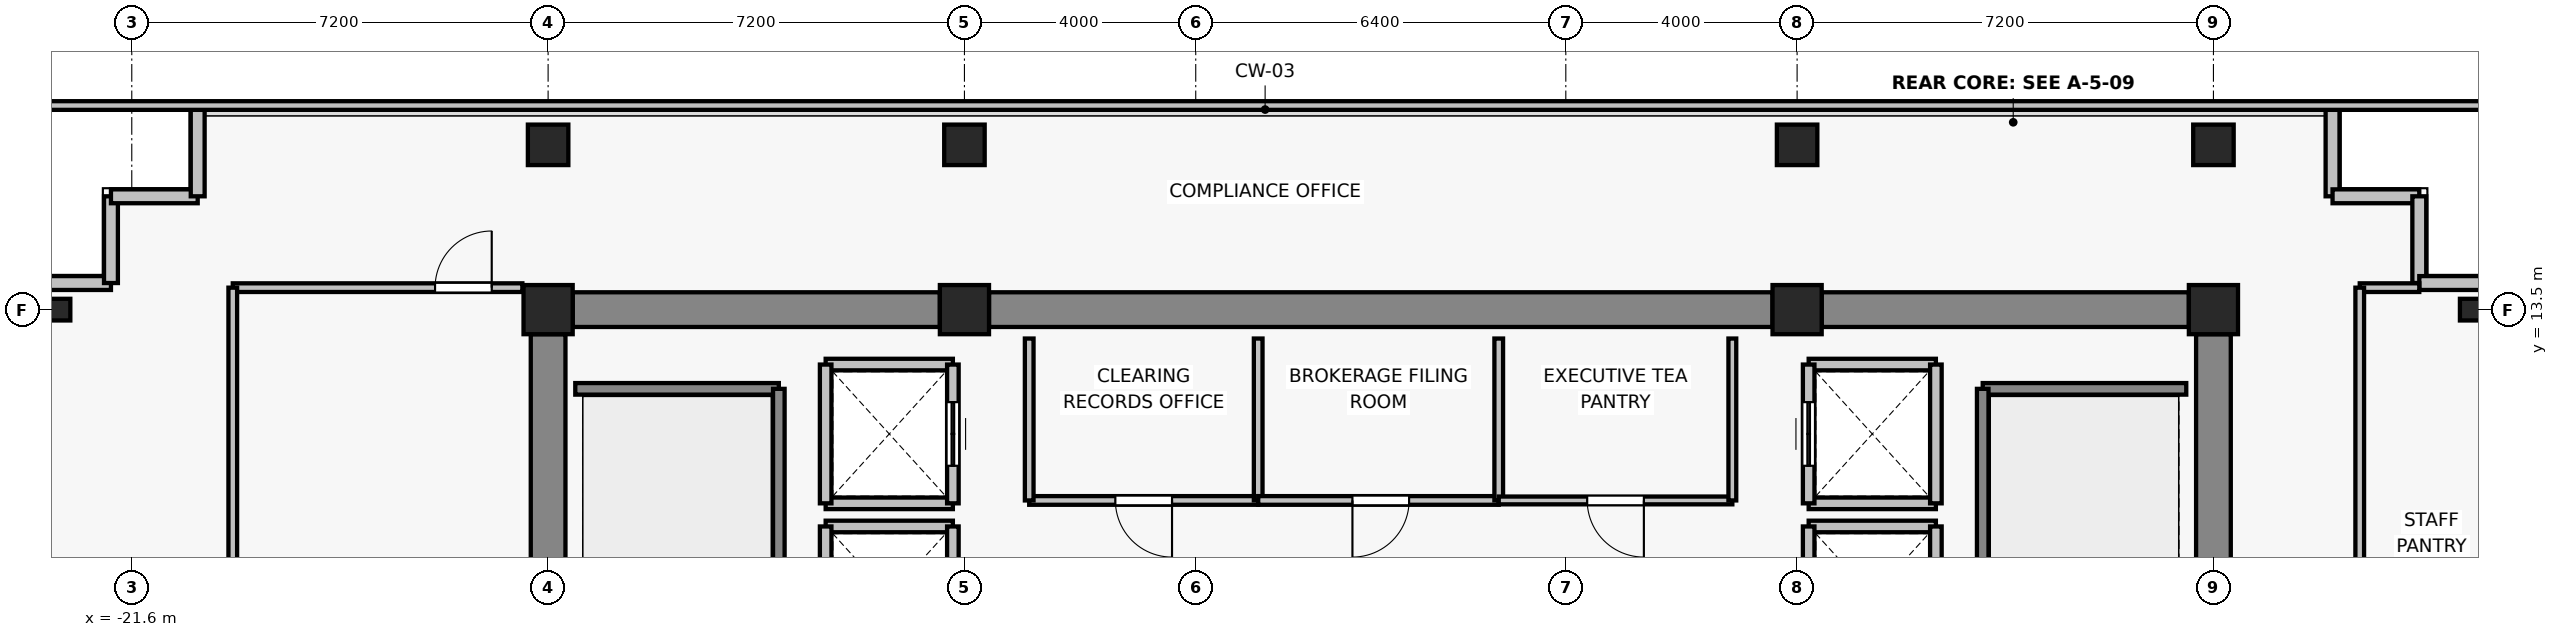
"""IFC4 building model, lengths in metres.
Left out: names, types, materials, properties, quantities, classifications, styles, units other than length and angle.
Written with IfcOpenShell. Run it as: python <this file> out.ifc"""

import sys

from ifc_helpers import new_model, si_unit, direction, frame, frame_2d, origin, origin_2d, place, context, subcontext, project, spatial, rectangle, i_section, extrude, source, transform, mapped, element, fill, save


model = new_model("IFC4")
c1 = context("Model", 3, precision=1e-05, world=origin(), true_north=direction((0.0, 1.0)))
c2 = subcontext(c1, "Body", "Model", "MODEL_VIEW")
j1 = project(units=[si_unit("LENGTHUNIT", "METRE"), si_unit("PLANEANGLEUNIT", "RADIAN")], contexts=[c1])
p1 = place(None, origin())
s1 = spatial("IfcSite", under=j1, at=p1, CompositionType="ELEMENT")
p2 = place(p1, origin())
s2 = spatial("IfcBuilding", under=s1, at=p2, CompositionType="ELEMENT")
p3 = place(p2, frame((0.0, 0.0, 222.1)))
s3 = spatial("IfcBuildingStorey", under=s2, at=p3, CompositionType="ELEMENT", Elevation=222.1)
for number, where, z_axis, x_axis in (
    (1, (-14.4, 13.5, 0.0), (0.0, 0.0, 1.0), (1.0, 0.0, 0.0)),
    (2, (-7.2, 13.5, 0.0), (0.0, 0.0, 1.0), (1.0, 0.0, 0.0)),
    (3, (7.2, 13.5, 0.0), (0.0, 0.0, 1.0), (1.0, 0.0, 0.0)),
    (4, (14.4, 13.5, 0.0), (0.0, 0.0, 1.0), (1.0, 0.0, 0.0)),
):
    element("IfcColumn", number, at=place(p3, frame(where, z_axis=z_axis, x_axis=x_axis)), inside=s3, PredefinedType="COLUMN", context=c2, shape_type="SweptSolid", body=[
        extrude(rectangle(XDim=0.85, YDim=0.85, at=origin_2d()), origin(), (0.0, 0.0, 1.0), 3.3),
    ])
for number, where, z_axis, x_axis in (
    (5, (-14.4, 16.35, 0.0), (0.0, 0.0, 1.0), (1.0, 0.0, 0.0)),
    (6, (-7.2, 16.35, 0.0), (0.0, 0.0, 1.0), (1.0, 0.0, 0.0)),
    (7, (7.2, 16.35, 0.0), (0.0, 0.0, 1.0), (1.0, 0.0, 0.0)),
    (8, (14.4, 16.35, 0.0), (0.0, 0.0, 1.0), (1.0, 0.0, 0.0)),
):
    element("IfcColumn", number, at=place(p3, frame(where, z_axis=z_axis, x_axis=x_axis)), inside=s3, PredefinedType="COLUMN", context=c2, shape_type="SweptSolid", body=[
        extrude(rectangle(XDim=0.7, YDim=0.7, at=origin_2d()), origin(), (0.0, 0.0, 1.0), 3.3),
    ])
for number, where, z_axis, x_axis in (
    (9, (-22.85, 13.5, 0.0), (0.0, 0.0, 1.0), (1.0, 0.0, 0.0)),
    (10, (18.85, 13.5, 0.0), (0.0, 0.0, 1.0), (1.0, 0.0, 0.0)),
):
    element("IfcColumn", number, at=place(p3, frame(where, z_axis=z_axis, x_axis=x_axis)), inside=s3, PredefinedType="COLUMN", context=c2, shape_type="SweptSolid", body=[
        extrude(i_section(OverallWidth=0.375, OverallDepth=0.375, WebThickness=0.017, FlangeThickness=0.027, FilletRadius=0.015, at=origin_2d()), origin(), (0.0, 0.0, 1.0), 3.3),
    ])
p4 = place(p3, frame((-13.975, 13.5, 0.0), z_axis=(0.0, 0.0, 1.0), x_axis=(1.0, 0.0, 0.0)))
e11 = element("IfcWall", 11, at=p4, inside=s3, PredefinedType="SHEAR", context=c2, shape_type="SweptSolid", body=[
    extrude(rectangle(XDim=6.35, YDim=0.6, at=frame_2d((3.175, 0.0))), origin(), (0.0, 0.0, 1.0), 3.075),
])
p5 = place(p3, frame((-6.775, 13.5, 0.0), z_axis=(0.0, 0.0, 1.0), x_axis=(1.0, 0.0, 0.0)))
e12 = element("IfcWall", 12, at=p5, inside=s3, PredefinedType="SHEAR", context=c2, shape_type="SweptSolid", body=[
    extrude(rectangle(XDim=13.55, YDim=0.6, at=frame_2d((6.775, 0.0))), origin(), (0.0, 0.0, 1.0), 3.075),
])
p6 = place(p3, frame((7.625, 13.5, 0.0), z_axis=(0.0, 0.0, 1.0), x_axis=(1.0, 0.0, 0.0)))
e13 = element("IfcWall", 13, at=p6, inside=s3, PredefinedType="SHEAR", context=c2, shape_type="SweptSolid", body=[
    extrude(rectangle(XDim=6.35, YDim=0.6, at=frame_2d((3.175, 0.0))), origin(), (0.0, 0.0, 1.0), 3.075),
])
for number, where, z_axis, x_axis in (
    (14, (-14.4, 7.025, 0.0), (0.0, 0.0, 1.0), (0.0, 1.0, 0.0)),
    (15, (14.4, 7.025, 0.0), (0.0, 0.0, 1.0), (0.0, 1.0, 0.0)),
):
    element("IfcWall", number, at=place(p3, frame(where, z_axis=z_axis, x_axis=x_axis)), inside=s3, PredefinedType="SHEAR", context=c2, shape_type="SweptSolid", body=[
        extrude(rectangle(XDim=6.05, YDim=0.6, at=frame_2d((3.025, 0.0))), origin(), (0.0, 0.0, 1.0), 3.075),
    ])
for number, where, z_axis, x_axis in (
    (16, (-21.96, 13.96, 0.0), (0.0, 0.0, 1.0), (-1.0, 0.0, 0.0)),
    (17, (-21.96, 15.46, 0.0), (0.0, 0.0, 1.0), (0.0, -1.0, 0.0)),
    (18, (-20.46, 15.46, 0.0), (0.0, 0.0, 1.0), (-1.0, 0.0, 0.0)),
    (19, (-20.46, 16.96, 0.0), (0.0, 0.0, 1.0), (0.0, -1.0, 0.0)),
    (20, (16.46, 15.46, 0.0), (0.0, 0.0, 1.0), (0.0, 1.0, 0.0)),
    (21, (17.96, 15.46, 0.0), (0.0, 0.0, 1.0), (-1.0, 0.0, 0.0)),
    (22, (17.96, 13.96, 0.0), (0.0, 0.0, 1.0), (0.0, 1.0, 0.0)),
    (23, (19.46, 13.96, 0.0), (0.0, 0.0, 1.0), (-1.0, 0.0, 0.0)),
):
    element("IfcWall", number, at=place(p3, frame(where, z_axis=z_axis, x_axis=x_axis)), inside=s3, PredefinedType="SOLIDWALL", context=c2, shape_type="SweptSolid", body=[
        extrude(rectangle(XDim=1.5, YDim=0.24, at=frame_2d((0.75, 0.0))), origin(), (0.0, 0.0, 1.0), 3.075),
    ])
p7 = place(p3, frame((-9.6, 9.75, 0.0), z_axis=(0.0, 0.0, 1.0), x_axis=(1.0, 0.0, 0.0)))
e24 = element("IfcWall", 24, at=p7, inside=s3, PredefinedType="SOLIDWALL", context=c2, shape_type="SweptSolid", body=[
    extrude(rectangle(XDim=2.2, YDim=0.2, at=frame_2d((1.1, 0.0))), origin(), (0.0, 0.0, 1.0), 2.615),
])
p8 = place(p3, frame((-9.6, 7.35, 0.0), z_axis=(0.0, 0.0, 1.0), x_axis=(0.0, 1.0, 0.0)))
e25 = element("IfcWall", 25, at=p8, inside=s3, PredefinedType="SOLIDWALL", context=c2, shape_type="SweptSolid", body=[
    extrude(rectangle(XDim=2.4, YDim=0.2, at=frame_2d((1.2, 0.0))), origin(), (0.0, 0.0, 1.0), 3.075),
])
p9 = place(p3, frame((-7.4, 9.75, 0.0), z_axis=(0.0, 0.0, 1.0), x_axis=(0.0, -1.0, 0.0)))
e26 = element("IfcWall", 26, at=p9, inside=s3, PredefinedType="SOLIDWALL", context=c2, shape_type="SweptSolid", body=[
    extrude(rectangle(XDim=2.4, YDim=0.2, at=frame_2d((1.2, 0.0))), origin(), (0.0, 0.0, 1.0), 2.615),
])
p10 = place(p9, frame((0.65, 0.0, 0.0)))
e27 = element("IfcOpeningElement", 27, at=p10, cuts=e26, PredefinedType="OPENING", context=c2, shape_type="SweptSolid", body=[
    extrude(rectangle(XDim=1.1, YDim=2.2, at=frame_2d((0.55, 1.1))), frame((0.0, 0.11, 0.0), z_axis=(0.0, -1.0, 0.0), x_axis=(1.0, 0.0, 0.0)), (0.0, 0.0, 1.0), 0.22),
])
for number, where, z_axis, x_axis in (
    (28, (-7.4, 10.15, 0.0), (0.0, 0.0, 1.0), (-1.0, 0.0, 0.0)),
    (29, (-9.6, 12.55, 0.0), (0.0, 0.0, 1.0), (1.0, 0.0, 0.0)),
):
    element("IfcWall", number, at=place(p3, frame(where, z_axis=z_axis, x_axis=x_axis)), inside=s3, PredefinedType="SOLIDWALL", context=c2, shape_type="SweptSolid", body=[
        extrude(rectangle(XDim=2.2, YDim=0.2, at=frame_2d((1.1, 0.0))), origin(), (0.0, 0.0, 1.0), 2.615),
    ])
p11 = place(p3, frame((-9.6, 10.15, 0.0), z_axis=(0.0, 0.0, 1.0), x_axis=(0.0, 1.0, 0.0)))
e30 = element("IfcWall", 30, at=p11, inside=s3, PredefinedType="SOLIDWALL", context=c2, shape_type="SweptSolid", body=[
    extrude(rectangle(XDim=2.4, YDim=0.2, at=frame_2d((1.2, 0.0))), origin(), (0.0, 0.0, 1.0), 3.075),
])
p12 = place(p3, frame((-7.4, 12.55, 0.0), z_axis=(0.0, 0.0, 1.0), x_axis=(0.0, -1.0, 0.0)))
e31 = element("IfcWall", 31, at=p12, inside=s3, PredefinedType="SOLIDWALL", context=c2, shape_type="SweptSolid", body=[
    extrude(rectangle(XDim=2.4, YDim=0.2, at=frame_2d((1.2, 0.0))), origin(), (0.0, 0.0, 1.0), 2.615),
])
p13 = place(p12, frame((0.65, 0.0, 0.0)))
e32 = element("IfcOpeningElement", 32, at=p13, cuts=e31, PredefinedType="OPENING", context=c2, shape_type="SweptSolid", body=[
    extrude(rectangle(XDim=1.1, YDim=2.2, at=frame_2d((0.55, 1.1))), frame((0.0, 0.11, 0.0), z_axis=(0.0, -1.0, 0.0), x_axis=(1.0, 0.0, 0.0)), (0.0, 0.0, 1.0), 0.22),
])
p14 = place(p3, frame((7.4, 9.75, 0.0), z_axis=(0.0, 0.0, 1.0), x_axis=(1.0, 0.0, 0.0)))
e33 = element("IfcWall", 33, at=p14, inside=s3, PredefinedType="SOLIDWALL", context=c2, shape_type="SweptSolid", body=[
    extrude(rectangle(XDim=2.2, YDim=0.2, at=frame_2d((1.1, 0.0))), origin(), (0.0, 0.0, 1.0), 2.615),
])
p15 = place(p3, frame((7.4, 7.35, 0.0), z_axis=(0.0, 0.0, 1.0), x_axis=(0.0, 1.0, 0.0)))
e34 = element("IfcWall", 34, at=p15, inside=s3, PredefinedType="SOLIDWALL", context=c2, shape_type="SweptSolid", body=[
    extrude(rectangle(XDim=2.4, YDim=0.2, at=frame_2d((1.2, 0.0))), origin(), (0.0, 0.0, 1.0), 2.615),
])
p16 = place(p15, frame((0.65, 0.0, 0.0)))
e35 = element("IfcOpeningElement", 35, at=p16, cuts=e34, PredefinedType="OPENING", context=c2, shape_type="SweptSolid", body=[
    extrude(rectangle(XDim=1.1, YDim=2.2, at=frame_2d((0.55, 1.1))), frame((0.0, 0.11, 0.0), z_axis=(0.0, -1.0, 0.0), x_axis=(1.0, 0.0, 0.0)), (0.0, 0.0, 1.0), 0.22),
])
p17 = place(p3, frame((9.6, 9.75, 0.0), z_axis=(0.0, 0.0, 1.0), x_axis=(0.0, -1.0, 0.0)))
e36 = element("IfcWall", 36, at=p17, inside=s3, PredefinedType="SOLIDWALL", context=c2, shape_type="SweptSolid", body=[
    extrude(rectangle(XDim=2.4, YDim=0.2, at=frame_2d((1.2, 0.0))), origin(), (0.0, 0.0, 1.0), 3.075),
])
for number, where, z_axis, x_axis in (
    (37, (9.6, 10.15, 0.0), (0.0, 0.0, 1.0), (-1.0, 0.0, 0.0)),
    (38, (7.4, 12.55, 0.0), (0.0, 0.0, 1.0), (1.0, 0.0, 0.0)),
):
    element("IfcWall", number, at=place(p3, frame(where, z_axis=z_axis, x_axis=x_axis)), inside=s3, PredefinedType="SOLIDWALL", context=c2, shape_type="SweptSolid", body=[
        extrude(rectangle(XDim=2.2, YDim=0.2, at=frame_2d((1.1, 0.0))), origin(), (0.0, 0.0, 1.0), 2.615),
    ])
p18 = place(p3, frame((7.4, 10.15, 0.0), z_axis=(0.0, 0.0, 1.0), x_axis=(0.0, 1.0, 0.0)))
e39 = element("IfcWall", 39, at=p18, inside=s3, PredefinedType="SOLIDWALL", context=c2, shape_type="SweptSolid", body=[
    extrude(rectangle(XDim=2.4, YDim=0.2, at=frame_2d((1.2, 0.0))), origin(), (0.0, 0.0, 1.0), 2.615),
])
p19 = place(p18, frame((0.65, 0.0, 0.0)))
e40 = element("IfcOpeningElement", 40, at=p19, cuts=e39, PredefinedType="OPENING", context=c2, shape_type="SweptSolid", body=[
    extrude(rectangle(XDim=1.1, YDim=2.2, at=frame_2d((0.55, 1.1))), frame((0.0, 0.11, 0.0), z_axis=(0.0, -1.0, 0.0), x_axis=(1.0, 0.0, 0.0)), (0.0, 0.0, 1.0), 0.22),
])
p20 = place(p3, frame((9.6, 12.55, 0.0), z_axis=(0.0, 0.0, 1.0), x_axis=(0.0, -1.0, 0.0)))
e41 = element("IfcWall", 41, at=p20, inside=s3, PredefinedType="SOLIDWALL", context=c2, shape_type="SweptSolid", body=[
    extrude(rectangle(XDim=2.4, YDim=0.2, at=frame_2d((1.2, 0.0))), origin(), (0.0, 0.0, 1.0), 3.075),
])
p21 = place(p3, frame((-13.93, 12.13, 0.0), z_axis=(0.0, 0.0, 1.0), x_axis=(1.0, 0.0, 0.0)))
e42 = element("IfcWall", 42, at=p21, inside=s3, PredefinedType="SOLIDWALL", context=c2, shape_type="SweptSolid", body=[
    extrude(rectangle(XDim=3.52, YDim=0.2, at=frame_2d((1.76, 0.0))), origin(), (0.0, 0.0, 1.0), 3.075),
])
p22 = place(p3, frame((-10.41, 12.13, 0.0), z_axis=(0.0, 0.0, 1.0), x_axis=(0.0, -1.0, 0.0)))
e43 = element("IfcWall", 43, at=p22, inside=s3, PredefinedType="SOLIDWALL", context=c2, shape_type="SweptSolid", body=[
    extrude(rectangle(XDim=8.84, YDim=0.2, at=frame_2d((4.42, 0.0))), origin(), (0.0, 0.0, 1.0), 3.075),
])
p23 = place(p3, frame((10.41, 12.13, 0.0), z_axis=(0.0, 0.0, 1.0), x_axis=(1.0, 0.0, 0.0)))
e44 = element("IfcWall", 44, at=p23, inside=s3, PredefinedType="SOLIDWALL", context=c2, shape_type="SweptSolid", body=[
    extrude(rectangle(XDim=3.52, YDim=0.2, at=frame_2d((1.76, 0.0))), origin(), (0.0, 0.0, 1.0), 3.075),
])
p24 = place(p3, frame((10.41, 3.29, 0.0), z_axis=(0.0, 0.0, 1.0), x_axis=(0.0, 1.0, 0.0)))
e45 = element("IfcWall", 45, at=p24, inside=s3, PredefinedType="SOLIDWALL", context=c2, shape_type="SweptSolid", body=[
    extrude(rectangle(XDim=8.84, YDim=0.2, at=frame_2d((4.42, 0.0))), origin(), (0.0, 0.0, 1.0), 3.075),
])
p25 = place(p3, frame((-2.12, 10.2, 0.0), z_axis=(0.0, 0.0, 1.0), x_axis=(-1.0, 0.0, 0.0)))
e46 = element("IfcWall", 46, at=p25, inside=s3, PredefinedType="PARTITIONING", context=c2, shape_type="SweptSolid", body=[
    extrude(rectangle(XDim=3.96, YDim=0.15, at=frame_2d((1.98, 0.0))), origin(), (0.0, 0.0, 1.0), 3.075),
])
p26 = place(p25, frame((1.49, 0.0, 0.0)))
e47 = element("IfcOpeningElement", 47, at=p26, cuts=e46, PredefinedType="OPENING", context=c2, shape_type="SweptSolid", body=[
    extrude(rectangle(XDim=0.98, YDim=2.15, at=frame_2d((0.49, 1.075))), frame((0.0, 0.085, 0.0), z_axis=(0.0, -1.0, 0.0), x_axis=(1.0, 0.0, 0.0)), (0.0, 0.0, 1.0), 0.17),
])
for number, where, z_axis, x_axis in (
    (48, (-6.08, 10.2, 0.0), (0.0, 0.0, 1.0), (0.0, 1.0, 0.0)),
    (49, (-2.12, 13.0, 0.0), (0.0, 0.0, 1.0), (0.0, -1.0, 0.0)),
):
    element("IfcWall", number, at=place(p3, frame(where, z_axis=z_axis, x_axis=x_axis)), inside=s3, PredefinedType="PARTITIONING", context=c2, shape_type="SweptSolid", body=[
        extrude(rectangle(XDim=2.8, YDim=0.15, at=frame_2d((1.4, 0.0))), origin(), (0.0, 0.0, 1.0), 3.075),
    ])
p27 = place(p3, frame((2.04, 10.2, 0.0), z_axis=(0.0, 0.0, 1.0), x_axis=(-1.0, 0.0, 0.0)))
e50 = element("IfcWall", 50, at=p27, inside=s3, PredefinedType="PARTITIONING", context=c2, shape_type="SweptSolid", body=[
    extrude(rectangle(XDim=4.16, YDim=0.15, at=frame_2d((2.08, 0.0))), origin(), (0.0, 0.0, 1.0), 3.075),
])
p28 = place(p27, frame((1.55, 0.0, 0.0)))
e51 = element("IfcOpeningElement", 51, at=p28, cuts=e50, PredefinedType="OPENING", context=c2, shape_type="SweptSolid", body=[
    extrude(rectangle(XDim=0.98, YDim=2.15, at=frame_2d((0.49, 1.075))), frame((0.0, 0.085, 0.0), z_axis=(0.0, -1.0, 0.0), x_axis=(1.0, 0.0, 0.0)), (0.0, 0.0, 1.0), 0.17),
])
p29 = place(p3, frame((2.04, 13.0, 0.0), z_axis=(0.0, 0.0, 1.0), x_axis=(0.0, -1.0, 0.0)))
e52 = element("IfcWall", 52, at=p29, inside=s3, PredefinedType="PARTITIONING", context=c2, shape_type="SweptSolid", body=[
    extrude(rectangle(XDim=2.8, YDim=0.15, at=frame_2d((1.4, 0.0))), origin(), (0.0, 0.0, 1.0), 3.075),
])
p30 = place(p3, frame((6.08, 10.2, 0.0), z_axis=(0.0, 0.0, 1.0), x_axis=(-1.0, 0.0, 0.0)))
e53 = element("IfcWall", 53, at=p30, inside=s3, PredefinedType="PARTITIONING", context=c2, shape_type="SweptSolid", body=[
    extrude(rectangle(XDim=4.04, YDim=0.135, at=frame_2d((2.02, 0.0))), origin(), (0.0, 0.0, 1.0), 3.075),
])
p31 = place(p30, frame((1.53, 0.0, 0.0)))
e54 = element("IfcOpeningElement", 54, at=p31, cuts=e53, PredefinedType="OPENING", context=c2, shape_type="SweptSolid", body=[
    extrude(rectangle(XDim=0.98, YDim=2.15, at=frame_2d((0.49, 1.075))), frame((0.0, 0.077, 0.0), z_axis=(0.0, -1.0, 0.0), x_axis=(1.0, 0.0, 0.0)), (0.0, 0.0, 1.0), 0.155),
])
p32 = place(p3, frame((6.08, 13.0, 0.0), z_axis=(0.0, 0.0, 1.0), x_axis=(0.0, -1.0, 0.0)))
e55 = element("IfcWall", 55, at=p32, inside=s3, PredefinedType="PARTITIONING", context=c2, shape_type="SweptSolid", body=[
    extrude(rectangle(XDim=2.8, YDim=0.135, at=frame_2d((1.4, 0.0))), origin(), (0.0, 0.0, 1.0), 3.075),
])
p33 = place(p3, frame((-19.853, 13.88, 0.0), z_axis=(0.0, 0.0, 1.0), x_axis=(1.0, 0.0, 0.0)))
e56 = element("IfcWall", 56, at=p33, inside=s3, PredefinedType="PARTITIONING", context=c2, shape_type="SweptSolid", body=[
    extrude(rectangle(XDim=5.008, YDim=0.15, at=frame_2d((2.504, 0.0))), origin(), (0.0, 0.0, 1.0), 3.075),
])
p34 = place(p33, frame((3.498, 0.0, 0.0)))
e57 = element("IfcOpeningElement", 57, at=p34, cuts=e56, PredefinedType="OPENING", context=c2, shape_type="SweptSolid", body=[
    extrude(rectangle(XDim=0.98, YDim=2.15, at=frame_2d((0.49, 1.075))), frame((0.0, 0.085, 0.0), z_axis=(0.0, -1.0, 0.0), x_axis=(1.0, 0.0, 0.0)), (0.0, 0.0, 1.0), 0.17),
])
p35 = place(p3, frame((-19.853, -1.77, 0.0), z_axis=(0.0, 0.0, 1.0), x_axis=(0.0, 1.0, 0.0)))
e58 = element("IfcWall", 58, at=p35, inside=s3, PredefinedType="PARTITIONING", context=c2, shape_type="SweptSolid", body=[
    extrude(rectangle(XDim=15.65, YDim=0.15, at=frame_2d((7.825, 0.0))), origin(), (0.0, 0.0, 1.0), 2.615),
])
p36 = place(p3, frame((16.93, 13.88, 0.0), z_axis=(0.0, 0.0, 1.0), x_axis=(1.0, 0.0, 0.0)))
e59 = element("IfcWall", 59, at=p36, inside=s3, PredefinedType="PARTITIONING", context=c2, shape_type="SweptSolid", body=[
    extrude(rectangle(XDim=1.03, YDim=0.15, at=frame_2d((0.515, 0.0))), origin(), (0.0, 0.0, 1.0), 3.075),
])
p37 = place(p3, frame((16.93, -1.77, 0.0), z_axis=(0.0, 0.0, 1.0), x_axis=(0.0, 1.0, 0.0)))
e60 = element("IfcWall", 60, at=p37, inside=s3, PredefinedType="PARTITIONING", context=c2, shape_type="SweptSolid", body=[
    extrude(rectangle(XDim=15.65, YDim=0.15, at=frame_2d((7.825, 0.0))), origin(), (0.0, 0.0, 1.0), 2.615),
])
p38 = place(p37, frame((7.335, 0.0, 0.0)))
e61 = element("IfcOpeningElement", 61, at=p38, cuts=e60, PredefinedType="OPENING", context=c2, shape_type="SweptSolid", body=[
    extrude(rectangle(XDim=0.98, YDim=2.15, at=frame_2d((0.49, 1.075))), frame((0.0, 0.085, 0.0), z_axis=(0.0, -1.0, 0.0), x_axis=(1.0, 0.0, 0.0)), (0.0, 0.0, 1.0), 0.17),
])
p39 = place(p3, frame((-23.53, 17.03, 0.0), z_axis=(0.0, 0.0, 1.0), x_axis=(1.0, 0.0, 0.0)))
e62 = element("IfcWall", 62, at=p39, inside=s3, PredefinedType="PARTITIONING", context=c2, shape_type="SweptSolid", body=[
    extrude(rectangle(XDim=43.06, YDim=0.15, at=frame_2d((21.53, 0.0))), origin(), (0.0, 0.0, 1.0), 3.075),
])
m1 = source(origin(), c2, "Body", "SweptSolid", [
    extrude(rectangle(XDim=1.1, YDim=2.2, at=frame_2d((0.55, 1.1))), frame((0.0, 0.025, 0.0), z_axis=(0.0, -1.0, 0.0), x_axis=(1.0, 0.0, 0.0)), (0.0, 0.0, 1.0), 0.05),
])
p40 = place(p13, origin())
e63 = element("IfcDoor", 63, at=p40, inside=s3, OperationType="DOUBLE_DOOR_SLIDING", PredefinedType="DOOR", context=c2, shape_type="MappedRepresentation", body=[
    mapped(m1, transform((0.0, 0.0, 0.0), x_axis=(1.0, 0.0, 0.0), y_axis=(0.0, 1.0, 0.0), z_axis=(0.0, 0.0, 1.0), scale=1.0)),
])
fill(e32, e63)
p41 = place(p19, origin())
e64 = element("IfcDoor", 64, at=p41, inside=s3, OperationType="DOUBLE_DOOR_SLIDING", PredefinedType="DOOR", context=c2, shape_type="MappedRepresentation", body=[
    mapped(m1, transform((0.0, 0.0, 0.0), x_axis=(1.0, 0.0, 0.0), y_axis=(0.0, 1.0, 0.0), z_axis=(0.0, 0.0, 1.0), scale=1.0)),
])
fill(e40, e64)
m2 = source(origin(), c2, "Body", "SweptSolid", [
    extrude(rectangle(XDim=0.98, YDim=2.15, at=frame_2d((0.49, 1.075))), frame((0.0, 0.025, 0.0), z_axis=(0.0, -1.0, 0.0), x_axis=(1.0, 0.0, 0.0)), (0.0, 0.0, 1.0), 0.05),
])
p42 = place(p26, origin())
e65 = element("IfcDoor", 65, at=p42, inside=s3, OperationType="SINGLE_SWING_LEFT", PredefinedType="DOOR", context=c2, shape_type="MappedRepresentation", body=[
    mapped(m2, transform((0.0, 0.0, 0.0), x_axis=(1.0, 0.0, 0.0), y_axis=(0.0, 1.0, 0.0), z_axis=(0.0, 0.0, 1.0), scale=1.0)),
])
fill(e47, e65)
p43 = place(p28, origin())
e66 = element("IfcDoor", 66, at=p43, inside=s3, OperationType="SINGLE_SWING_RIGHT", PredefinedType="DOOR", context=c2, shape_type="MappedRepresentation", body=[
    mapped(m2, transform((0.0, 0.0, 0.0), x_axis=(1.0, 0.0, 0.0), y_axis=(0.0, 1.0, 0.0), z_axis=(0.0, 0.0, 1.0), scale=1.0)),
])
fill(e51, e66)
p44 = place(p31, origin())
e67 = element("IfcDoor", 67, at=p44, inside=s3, OperationType="SINGLE_SWING_LEFT", PredefinedType="DOOR", context=c2, shape_type="MappedRepresentation", body=[
    mapped(m2, transform((0.0, 0.0, 0.0), x_axis=(1.0, 0.0, 0.0), y_axis=(0.0, 1.0, 0.0), z_axis=(0.0, 0.0, 1.0), scale=1.0)),
])
fill(e54, e67)
p45 = place(p34, origin())
e68 = element("IfcDoor", 68, at=p45, inside=s3, OperationType="SINGLE_SWING_RIGHT", PredefinedType="DOOR", context=c2, shape_type="MappedRepresentation", body=[
    mapped(m2, transform((0.0, 0.0, 0.0), x_axis=(1.0, 0.0, 0.0), y_axis=(0.0, 1.0, 0.0), z_axis=(0.0, 0.0, 1.0), scale=1.0)),
])
fill(e57, e68)
save(model, sys.argv[1])
